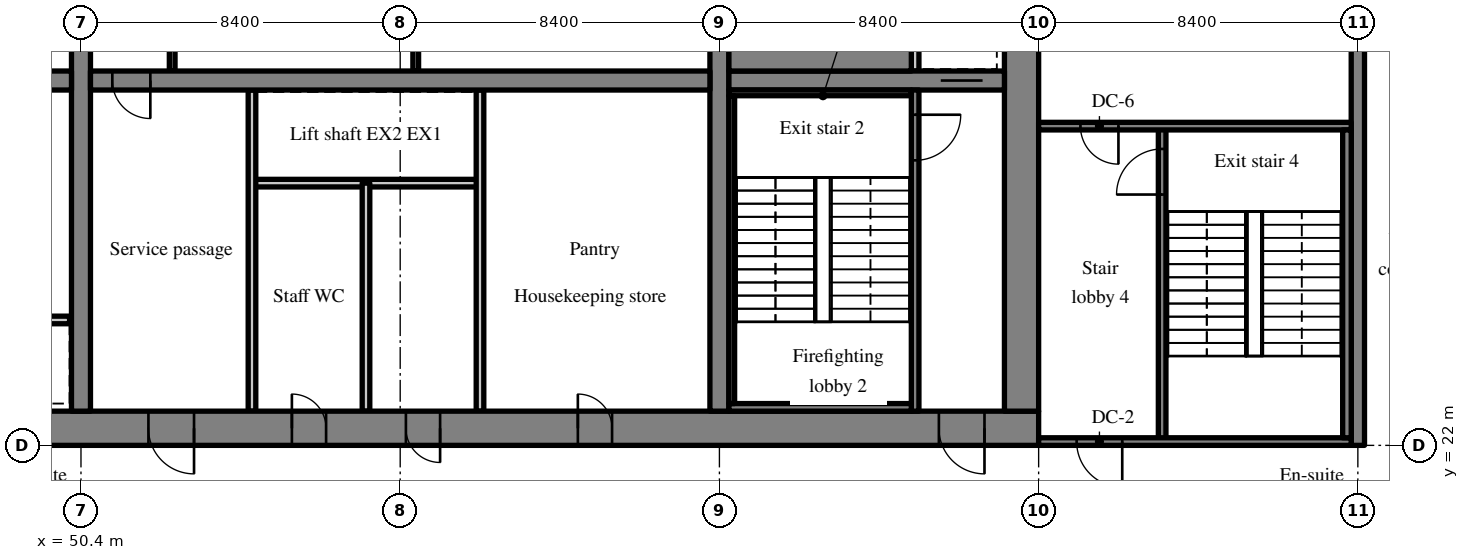
"""IFC4 building model, lengths in metres.
Left out: names, types, materials, properties, quantities, classifications, styles, units other than length and angle.
Written with IfcOpenShell. Run it as: python <this file> out.ifc"""

import sys

from ifc_helpers import new_model, si_unit, direction, frame, frame_2d, origin, place, context, subcontext, project, spatial, rectangle, extrude, source, transform, mapped, element, fill, save


model = new_model("IFC4")
c1 = context("Model", 3, precision=1e-05, world=origin(), true_north=direction((0.0, 1.0)))
c2 = subcontext(c1, "Body", "Model", "MODEL_VIEW")
j1 = project(units=[si_unit("LENGTHUNIT", "METRE"), si_unit("PLANEANGLEUNIT", "RADIAN")], contexts=[c1])
p1 = place(None, origin())
s1 = spatial("IfcSite", under=j1, at=p1, CompositionType="ELEMENT")
p2 = place(p1, origin())
s2 = spatial("IfcBuilding", under=s1, at=p2, CompositionType="ELEMENT")
p3 = place(p2, frame((0.0, 0.0, 125.6)))
s3 = spatial("IfcBuildingStorey", under=s2, at=p3, CompositionType="ELEMENT", Elevation=125.6)
m1 = source(origin(), c2, "Body", "SweptSolid", [
    extrude(rectangle(XDim=50.4, YDim=0.9, at=frame_2d((25.2, 0.0))), origin(), (0.0, 0.0, 1.0), 3.52),
])
p4 = place(p3, frame((25.2, 22.45, 0.0), z_axis=(0.0, 0.0, 1.0), x_axis=(1.0, 0.0, 0.0)))
e1 = element("IfcWall", 1, at=p4, inside=s3, PredefinedType="SHEAR", context=c2, shape_type="MappedRepresentation", body=[
    mapped(m1, transform((0.0, 0.0, 0.0), scale=1.0)),
])
m2 = source(origin(), c2, "Body", "SweptSolid", [
    extrude(rectangle(XDim=1.8, YDim=2.1, at=frame_2d((0.9, 1.05))), frame((0.0, 0.46, 0.0), z_axis=(0.0, -1.0, 0.0), x_axis=(1.0, 0.0, 0.0)), (0.0, 0.0, 1.0), 0.92),
])
p5 = place(p4, frame((15.9, 0.0, 0.0)))
e2 = element("IfcOpeningElement", 2, at=p5, cuts=e1, PredefinedType="OPENING", context=c2, shape_type="MappedRepresentation", body=[
    mapped(m2, transform((0.0, 0.0, 0.0), scale=1.0)),
])
m3 = source(origin(), c2, "Body", "SweptSolid", [
    extrude(rectangle(XDim=1.2, YDim=2.1, at=frame_2d((0.6, 1.05))), frame((0.0, 0.46, 0.0), z_axis=(0.0, -1.0, 0.0), x_axis=(1.0, 0.0, 0.0)), (0.0, 0.0, 1.0), 0.92),
])
p6 = place(p4, frame((26.975, 0.0, 0.0)))
e3 = element("IfcOpeningElement", 3, at=p6, cuts=e1, PredefinedType="OPENING", context=c2, shape_type="MappedRepresentation", body=[
    mapped(m3, transform((0.0, 0.0, 0.0), scale=1.0)),
])
m4 = source(origin(), c2, "Body", "SweptSolid", [
    extrude(rectangle(XDim=0.9, YDim=2.1, at=frame_2d((0.45, 1.05))), frame((0.0, 0.46, 0.0), z_axis=(0.0, -1.0, 0.0), x_axis=(1.0, 0.0, 0.0)), (0.0, 0.0, 1.0), 0.92),
])
p7 = place(p4, frame((33.75, 0.0, 0.0)))
e4 = element("IfcOpeningElement", 4, at=p7, cuts=e1, PredefinedType="OPENING", context=c2, shape_type="MappedRepresentation", body=[
    mapped(m4, transform((0.0, 0.0, 0.0), scale=1.0)),
])
p8 = place(p4, frame((30.75, 0.0, 0.0)))
e5 = element("IfcOpeningElement", 5, at=p8, cuts=e1, PredefinedType="OPENING", context=c2, shape_type="MappedRepresentation", body=[
    mapped(m4, transform((0.0, 0.0, 0.0), scale=1.0)),
])
p9 = place(p4, frame((38.275, 0.0, 0.0)))
e6 = element("IfcOpeningElement", 6, at=p9, cuts=e1, PredefinedType="OPENING", context=c2, shape_type="MappedRepresentation", body=[
    mapped(m4, transform((0.0, 0.0, 0.0), scale=1.0)),
])
p10 = place(p4, frame((6.45, 0.0, 0.0)))
e7 = element("IfcOpeningElement", 7, at=p10, cuts=e1, PredefinedType="OPENING", context=c2, shape_type="MappedRepresentation", body=[
    mapped(m3, transform((0.0, 0.0, 0.0), scale=1.0)),
])
p11 = place(p4, frame((47.775, 0.0, 0.0)))
e8 = element("IfcOpeningElement", 8, at=p11, cuts=e1, PredefinedType="OPENING", context=c2, shape_type="MappedRepresentation", body=[
    mapped(m3, transform((0.0, 0.0, 0.0), scale=1.0)),
])
m5 = source(origin(), c2, "Body", "SweptSolid", [
    extrude(rectangle(XDim=18.2, YDim=0.9, at=frame_2d((9.1, 0.0))), origin(), (0.0, 0.0, 1.0), 3.52),
])
p12 = place(p3, frame((75.15, 22.9, 0.0), z_axis=(0.0, 0.0, 1.0), x_axis=(0.0, 1.0, 0.0)))
e9 = element("IfcWall", 9, at=p12, inside=s3, PredefinedType="SHEAR", context=c2, shape_type="MappedRepresentation", body=[
    mapped(m5, transform((0.0, 0.0, 0.0), scale=1.0)),
])
p13 = place(p12, frame((12.5, 0.0, 0.0)))
e10 = element("IfcOpeningElement", 10, at=p13, cuts=e9, PredefinedType="OPENING", context=c2, shape_type="MappedRepresentation", body=[
    mapped(m3, transform((0.0, 0.0, 0.0), scale=1.0)),
])
m6 = source(origin(), c2, "Body", "SweptSolid", [
    extrude(rectangle(XDim=18.2, YDim=0.5, at=frame_2d((9.1, 0.0))), origin(), (0.0, 0.0, 1.0), 3.52),
])
p14 = place(p3, frame((50.4, 22.9, 0.0), z_axis=(0.0, 0.0, 1.0), x_axis=(0.0, 1.0, 0.0)))
e11 = element("IfcWall", 11, at=p14, inside=s3, PredefinedType="SHEAR", context=c2, shape_type="MappedRepresentation", body=[
    mapped(m6, transform((0.0, 0.0, 0.0), scale=1.0)),
])
m7 = source(origin(), c2, "Body", "SweptSolid", [
    extrude(rectangle(XDim=1.1, YDim=2.1, at=frame_2d((0.55, 1.05))), frame((0.0, 0.26, 0.0), z_axis=(0.0, -1.0, 0.0), x_axis=(1.0, 0.0, 0.0)), (0.0, 0.0, 1.0), 0.52),
])
p15 = place(p14, frame((12.55, 0.0, 0.0)))
e12 = element("IfcOpeningElement", 12, at=p15, cuts=e11, PredefinedType="OPENING", context=c2, shape_type="MappedRepresentation", body=[
    mapped(m7, transform((0.0, 0.0, 0.0), scale=1.0)),
])
p16 = place(p3, frame((67.2, 22.9, 0.0), z_axis=(0.0, 0.0, 1.0), x_axis=(0.0, 1.0, 0.0)))
e13 = element("IfcWall", 13, at=p16, inside=s3, PredefinedType="SHEAR", context=c2, shape_type="MappedRepresentation", body=[
    mapped(m6, transform((0.0, 0.0, 0.0), scale=1.0)),
])
m8 = source(origin(), c2, "Body", "SweptSolid", [
    extrude(rectangle(XDim=16.3, YDim=0.5, at=frame_2d((8.15, 0.0))), origin(), (0.0, 0.0, 1.0), 3.52),
])
p17 = place(p3, frame((33.85, 31.6, 0.0), z_axis=(0.0, 0.0, 1.0), x_axis=(1.0, 0.0, 0.0)))
e14 = element("IfcWall", 14, at=p17, inside=s3, PredefinedType="SHEAR", context=c2, shape_type="MappedRepresentation", body=[
    mapped(m8, transform((0.0, 0.0, 0.0), scale=1.0)),
])
m9 = source(origin(), c2, "Body", "SweptSolid", [
    extrude(rectangle(XDim=1.0, YDim=2.1, at=frame_2d((0.5, 1.05))), frame((0.0, 0.26, 0.0), z_axis=(0.0, -1.0, 0.0), x_axis=(1.0, 0.0, 0.0)), (0.0, 0.0, 1.0), 0.52),
])
p18 = place(p17, frame((14.725, 0.0, 0.0)))
e15 = element("IfcOpeningElement", 15, at=p18, cuts=e14, PredefinedType="OPENING", context=c2, shape_type="MappedRepresentation", body=[
    mapped(m9, transform((0.0, 0.0, 0.0), scale=1.0)),
])
m10 = source(origin(), c2, "Body", "SweptSolid", [
    extrude(rectangle(XDim=16.3, YDim=0.5, at=frame_2d((8.15, 0.0))), origin(), (0.0, 0.0, 1.0), 3.52),
])
p19 = place(p3, frame((50.65, 31.6, 0.0), z_axis=(0.0, 0.0, 1.0), x_axis=(1.0, 0.0, 0.0)))
e16 = element("IfcWall", 16, at=p19, inside=s3, PredefinedType="SHEAR", context=c2, shape_type="MappedRepresentation", body=[
    mapped(m10, transform((0.0, 0.0, 0.0), scale=1.0)),
])
p20 = place(p19, frame((0.575, 0.0, 0.0)))
e17 = element("IfcOpeningElement", 17, at=p20, cuts=e16, PredefinedType="OPENING", context=c2, shape_type="MappedRepresentation", body=[
    mapped(m9, transform((0.0, 0.0, 0.0), scale=1.0)),
])
m11 = source(origin(), c2, "Body", "SweptSolid", [
    extrude(rectangle(XDim=7.25, YDim=0.5, at=frame_2d((3.625, 0.0))), origin(), (0.0, 0.0, 1.0), 3.52),
])
p21 = place(p3, frame((67.45, 31.6, 0.0), z_axis=(0.0, 0.0, 1.0), x_axis=(1.0, 0.0, 0.0)))
e18 = element("IfcWall", 18, at=p21, inside=s3, PredefinedType="SHEAR", context=c2, shape_type="MappedRepresentation", body=[
    mapped(m11, transform((0.0, 0.0, 0.0), scale=1.0)),
])
p22 = place(p21, frame((5.575, 0.0, 0.0)))
e19 = element("IfcOpeningElement", 19, at=p22, cuts=e18, PredefinedType="OPENING", context=c2, shape_type="MappedRepresentation", body=[
    mapped(m7, transform((0.0, 0.0, 0.0), scale=1.0)),
])
m12 = source(origin(), c2, "Body", "SweptSolid", [
    extrude(rectangle(XDim=20.0, YDim=0.35, at=frame_2d((10.0, 0.0))), origin(), (0.0, 0.0, 1.0), 3.52),
])
p23 = place(p3, frame((84.0, 22.0, 0.0), z_axis=(0.0, 0.0, 1.0), x_axis=(0.0, 1.0, 0.0)))
e20 = element("IfcWall", 20, at=p23, inside=s3, PredefinedType="SHEAR", context=c2, shape_type="MappedRepresentation", body=[
    mapped(m12, transform((0.0, 0.0, 0.0), scale=1.0)),
])
m13 = source(origin(), c2, "Body", "SweptSolid", [
    extrude(rectangle(XDim=6.0, YDim=0.2, at=frame_2d((3.0, 0.0))), origin(), (0.0, 0.0, 1.0), 3.52),
])
p24 = place(p3, frame((44.1, 25.3, 0.0), z_axis=(0.0, 0.0, 1.0), x_axis=(1.0, 0.0, 0.0)))
e21 = element("IfcWall", 21, at=p24, inside=s3, PredefinedType="SOLIDWALL", context=c2, shape_type="MappedRepresentation", body=[
    mapped(m13, transform((0.0, 0.0, 0.0), scale=1.0)),
])
m14 = source(origin(), c2, "Body", "SweptSolid", [
    extrude(rectangle(XDim=1.1, YDim=2.1, at=frame_2d((0.55, 1.05))), frame((0.0, 0.11, 0.0), z_axis=(0.0, -1.0, 0.0), x_axis=(1.0, 0.0, 0.0)), (0.0, 0.0, 1.0), 0.22),
])
p25 = place(p24, frame((0.95, 0.0, 0.0)))
e22 = element("IfcOpeningElement", 22, at=p25, cuts=e21, PredefinedType="OPENING", context=c2, shape_type="MappedRepresentation", body=[
    mapped(m14, transform((0.0, 0.0, 0.0), scale=1.0)),
])
p26 = place(p24, frame((3.95, 0.0, 0.0)))
e23 = element("IfcOpeningElement", 23, at=p26, cuts=e21, PredefinedType="OPENING", context=c2, shape_type="MappedRepresentation", body=[
    mapped(m14, transform((0.0, 0.0, 0.0), scale=1.0)),
])
p27 = place(p3, frame((60.9, 28.9, 0.0), z_axis=(0.0, 0.0, 1.0), x_axis=(-1.0, 0.0, 0.0)))
e24 = element("IfcWall", 24, at=p27, inside=s3, PredefinedType="SOLIDWALL", context=c2, shape_type="MappedRepresentation", body=[
    mapped(m13, transform((0.0, 0.0, 0.0), scale=1.0)),
])
m15 = source(origin(), c2, "Body", "SweptSolid", [
    extrude(rectangle(XDim=8.45, YDim=0.2, at=frame_2d((4.225, 0.0))), origin(), (0.0, 0.0, 1.0), 3.52),
])
for number, where, z_axis, x_axis in (
    (25, (54.9, 22.9, 0.0), (0.0, 0.0, 1.0), (0.0, 1.0, 0.0)),
    (26, (60.9, 22.9, 0.0), (0.0, 0.0, 1.0), (0.0, 1.0, 0.0)),
):
    element("IfcWall", number, at=place(p3, frame(where, z_axis=z_axis, x_axis=x_axis)), inside=s3, PredefinedType="PARTITIONING", context=c2, shape_type="MappedRepresentation", body=[
        mapped(m15, transform((0.0, 0.0, 0.0), scale=1.0)),
    ])
p28 = place(p3, frame((57.9, 22.9, 0.0), z_axis=(0.0, 0.0, 1.0), x_axis=(0.0, 1.0, 0.0)))
e27 = element("IfcWall", 27, at=p28, inside=s3, PredefinedType="PARTITIONING", context=c2, shape_type="MappedRepresentation", body=[
    mapped(m13, transform((0.0, 0.0, 0.0), scale=1.0)),
])
m16 = source(origin(), c2, "Body", "SweptSolid", [
    extrude(rectangle(XDim=3.15, YDim=0.15, at=frame_2d((1.575, 0.0))), origin(), (0.0, 0.0, 1.0), 3.52),
])
for number, where, z_axis, x_axis in (
    (28, (52.8, 31.85, 0.0), (0.0, 0.0, 1.0), (0.0, 1.0, 0.0)),
    (29, (59.209, 31.85, 0.0), (0.0, 0.0, 1.0), (0.0, 1.0, 0.0)),
):
    element("IfcWall", number, at=place(p3, frame(where, z_axis=z_axis, x_axis=x_axis)), inside=s3, PredefinedType="PARTITIONING", context=c2, shape_type="MappedRepresentation", body=[
        mapped(m16, transform((0.0, 0.0, 0.0), scale=1.0)),
    ])
m17 = source(origin(), c2, "Body", "SweptSolid", [
    extrude(rectangle(XDim=8.45, YDim=0.2, at=frame_2d((4.225, 0.0))), origin(), (0.0, 0.0, 1.0), 3.52),
])
p29 = place(p3, frame((72.35, 22.9, 0.0), z_axis=(0.0, 0.0, 1.0), x_axis=(0.0, 1.0, 0.0)))
e30 = element("IfcWall", 30, at=p29, inside=s3, PredefinedType="SOLIDWALL", context=c2, shape_type="MappedRepresentation", body=[
    mapped(m17, transform((0.0, 0.0, 0.0), scale=1.0)),
])
m18 = source(origin(), c2, "Body", "SweptSolid", [
    extrude(rectangle(XDim=1.2, YDim=2.1, at=frame_2d((0.6, 1.05))), frame((0.0, 0.11, 0.0), z_axis=(0.0, -1.0, 0.0), x_axis=(1.0, 0.0, 0.0)), (0.0, 0.0, 1.0), 0.22),
])
p30 = place(p29, frame((6.6, 0.0, 0.0)))
e31 = element("IfcOpeningElement", 31, at=p30, cuts=e30, PredefinedType="OPENING", context=c2, shape_type="MappedRepresentation", body=[
    mapped(m18, transform((0.0, 0.0, 0.0), scale=1.0)),
])
m19 = source(origin(), c2, "Body", "SweptSolid", [
    extrude(rectangle(XDim=1.75, YDim=0.2, at=frame_2d((0.875, 0.0))), origin(), (0.0, 0.0, 1.0), 3.52),
])
p31 = place(p3, frame((72.35, 31.85, 0.0), z_axis=(0.0, 0.0, 1.0), x_axis=(0.0, 1.0, 0.0)))
e32 = element("IfcWall", 32, at=p31, inside=s3, PredefinedType="SOLIDWALL", context=c2, shape_type="MappedRepresentation", body=[
    mapped(m19, transform((0.0, 0.0, 0.0), scale=1.0)),
])
m20 = source(origin(), c2, "Body", "SweptSolid", [
    extrude(rectangle(XDim=8.3, YDim=0.2, at=frame_2d((4.15, 0.0))), origin(), (0.0, 0.0, 1.0), 3.52),
])
p32 = place(p3, frame((78.85, 22.1, 0.0), z_axis=(0.0, 0.0, 1.0), x_axis=(0.0, 1.0, 0.0)))
e33 = element("IfcWall", 33, at=p32, inside=s3, PredefinedType="SOLIDWALL", context=c2, shape_type="MappedRepresentation", body=[
    mapped(m20, transform((0.0, 0.0, 0.0), scale=1.0)),
])
p33 = place(p32, frame((6.5, 0.0, 0.0)))
e34 = element("IfcOpeningElement", 34, at=p33, cuts=e33, PredefinedType="OPENING", context=c2, shape_type="MappedRepresentation", body=[
    mapped(m18, transform((0.0, 0.0, 0.0), scale=1.0)),
])
m21 = source(origin(), c2, "Body", "SweptSolid", [
    extrude(rectangle(XDim=8.225, YDim=0.2, at=frame_2d((4.112, 0.0))), origin(), (0.0, 0.0, 1.0), 3.52),
])
p34 = place(p3, frame((83.825, 22.1, 0.0), z_axis=(0.0, 0.0, 1.0), x_axis=(-1.0, 0.0, 0.0)))
e35 = element("IfcWall", 35, at=p34, inside=s3, PredefinedType="SOLIDWALL", context=c2, shape_type="MappedRepresentation", body=[
    mapped(m21, transform((0.0, 0.0, 0.0), scale=1.0)),
])
p35 = place(p34, frame((6.025, 0.0, 0.0)))
e36 = element("IfcOpeningElement", 36, at=p35, cuts=e35, PredefinedType="OPENING", context=c2, shape_type="MappedRepresentation", body=[
    mapped(m18, transform((0.0, 0.0, 0.0), scale=1.0)),
])
p36 = place(p3, frame((83.825, 30.4, 0.0), z_axis=(0.0, 0.0, 1.0), x_axis=(-1.0, 0.0, 0.0)))
e37 = element("IfcWall", 37, at=p36, inside=s3, PredefinedType="SOLIDWALL", context=c2, shape_type="MappedRepresentation", body=[
    mapped(m21, transform((0.0, 0.0, 0.0), scale=1.0)),
])
m22 = source(origin(), c2, "Body", "SweptSolid", [
    extrude(rectangle(XDim=1.0, YDim=2.1, at=frame_2d((0.5, 1.05))), frame((0.0, 0.11, 0.0), z_axis=(0.0, -1.0, 0.0), x_axis=(1.0, 0.0, 0.0)), (0.0, 0.0, 1.0), 0.22),
])
p37 = place(p36, frame((6.125, 0.0, 0.0)))
e38 = element("IfcOpeningElement", 38, at=p37, cuts=e37, PredefinedType="OPENING", context=c2, shape_type="MappedRepresentation", body=[
    mapped(m22, transform((0.0, 0.0, 0.0), scale=1.0)),
])
m23 = source(origin(), c2, "Body", "SweptSolid", [
    extrude(rectangle(XDim=4.8, YDim=0.2, at=frame_2d((2.4, 0.0))), origin(), (0.0, 0.0, 1.0), 3.52),
])
p38 = place(p3, frame((67.45, 23.0, 0.0), z_axis=(0.0, 0.0, 1.0), x_axis=(1.0, 0.0, 0.0)))
e39 = element("IfcWall", 39, at=p38, inside=s3, PredefinedType="SOLIDWALL", context=c2, shape_type="MappedRepresentation", body=[
    mapped(m23, transform((0.0, 0.0, 0.0), scale=1.0)),
])
m24 = source(origin(), c2, "Body", "SweptSolid", [
    extrude(rectangle(XDim=4.8, YDim=0.15, at=frame_2d((2.4, 0.0))), origin(), (0.0, 0.0, 1.0), 3.52),
])
p39 = place(p3, frame((67.45, 31.275, 0.0), z_axis=(0.0, 0.0, 1.0), x_axis=(1.0, 0.0, 0.0)))
e40 = element("IfcWall", 40, at=p39, inside=s3, PredefinedType="SOLIDWALL", context=c2, shape_type="MappedRepresentation", body=[
    mapped(m24, transform((0.0, 0.0, 0.0), scale=1.0)),
])
m25 = source(origin(), c2, "Body", "SweptSolid", [
    extrude(rectangle(XDim=8.1, YDim=0.15, at=frame_2d((4.05, 0.0))), origin(), (0.0, 0.0, 1.0), 3.52),
])
p40 = place(p3, frame((67.525, 23.1, 0.0), z_axis=(0.0, 0.0, 1.0), x_axis=(0.0, 1.0, 0.0)))
e41 = element("IfcWall", 41, at=p40, inside=s3, PredefinedType="SOLIDWALL", context=c2, shape_type="MappedRepresentation", body=[
    mapped(m25, transform((0.0, 0.0, 0.0), scale=1.0)),
])
m26 = source(origin(), c2, "Body", "SweptSolid", [
    extrude(rectangle(XDim=4.8, YDim=0.95, at=frame_2d((2.4, 0.0))), origin(), (0.0, 0.0, 1.0), 3.52),
])
p41 = place(p3, frame((67.45, 32.325, 0.0), z_axis=(0.0, 0.0, 1.0), x_axis=(1.0, 0.0, 0.0)))
e42 = element("IfcWall", 42, at=p41, inside=s3, PredefinedType="SOLIDWALL", context=c2, shape_type="MappedRepresentation", body=[
    mapped(m26, transform((0.0, 0.0, 0.0), scale=1.0)),
])
m27 = source(origin(), c2, "Body", "SweptSolid", [
    extrude(rectangle(XDim=8.1, YDim=0.225, at=frame_2d((4.05, 0.0))), origin(), (0.0, 0.0, 1.0), 3.52),
])
p42 = place(p3, frame((83.713, 22.2, 0.0), z_axis=(0.0, 0.0, 1.0), x_axis=(0.0, 1.0, 0.0)))
e43 = element("IfcWall", 43, at=p42, inside=s3, PredefinedType="SOLIDWALL", context=c2, shape_type="MappedRepresentation", body=[
    mapped(m27, transform((0.0, 0.0, 0.0), scale=1.0)),
])
m28 = source(origin(), c2, "Body", "SweptSolid", [
    extrude(rectangle(XDim=1.2, YDim=2.1, at=frame_2d((0.6, 1.05))), frame((0.0, 0.375, 0.0), z_axis=(0.0, -1.0, 0.0), x_axis=(1.0, 0.0, 0.0)), (0.0, 0.0, 1.0), 0.05),
])
p43 = place(p6, origin())
e44 = element("IfcDoor", 44, at=p43, inside=s3, OperationType="SINGLE_SWING_RIGHT", PredefinedType="DOOR", context=c2, shape_type="MappedRepresentation", body=[
    mapped(m28, transform((0.0, 0.0, 0.0), scale=1.0)),
])
fill(e3, e44)
m29 = source(origin(), c2, "Body", "SweptSolid", [
    extrude(rectangle(XDim=1.0, YDim=2.1, at=frame_2d((0.5, 1.05))), frame((0.0, 0.025, 0.0), z_axis=(0.0, -1.0, 0.0), x_axis=(1.0, 0.0, 0.0)), (0.0, 0.0, 1.0), 0.05),
])
p44 = place(p20, origin())
e45 = element("IfcDoor", 45, at=p44, inside=s3, OperationType="SINGLE_SWING_RIGHT", PredefinedType="DOOR", context=c2, shape_type="MappedRepresentation", body=[
    mapped(m29, transform((0.0, 0.0, 0.0), scale=1.0)),
])
fill(e17, e45)
m30 = source(origin(), c2, "Body", "SweptSolid", [
    extrude(rectangle(XDim=0.9, YDim=2.1, at=frame_2d((0.45, 1.05))), frame((0.0, 0.375, 0.0), z_axis=(0.0, -1.0, 0.0), x_axis=(1.0, 0.0, 0.0)), (0.0, 0.0, 1.0), 0.05),
])
p45 = place(p7, origin())
e46 = element("IfcDoor", 46, at=p45, inside=s3, OperationType="SINGLE_SWING_RIGHT", PredefinedType="DOOR", context=c2, shape_type="MappedRepresentation", body=[
    mapped(m30, transform((0.0, 0.0, 0.0), scale=1.0)),
])
fill(e4, e46)
p46 = place(p8, origin())
e47 = element("IfcDoor", 47, at=p46, inside=s3, OperationType="SINGLE_SWING_LEFT", PredefinedType="DOOR", context=c2, shape_type="MappedRepresentation", body=[
    mapped(m30, transform((0.0, 0.0, 0.0), scale=1.0)),
])
fill(e5, e47)
p47 = place(p9, origin())
e48 = element("IfcDoor", 48, at=p47, inside=s3, OperationType="SINGLE_SWING_LEFT", PredefinedType="DOOR", context=c2, shape_type="MappedRepresentation", body=[
    mapped(m30, transform((0.0, 0.0, 0.0), scale=1.0)),
])
fill(e6, e48)
m31 = source(origin(), c2, "Body", "SweptSolid", [
    extrude(rectangle(XDim=1.2, YDim=2.1, at=frame_2d((0.6, 1.05))), frame((0.0, 0.025, 0.0), z_axis=(0.0, -1.0, 0.0), x_axis=(1.0, 0.0, 0.0)), (0.0, 0.0, 1.0), 0.05),
])
p48 = place(p30, origin())
e49 = element("IfcDoor", 49, at=p48, inside=s3, OperationType="SINGLE_SWING_RIGHT", PredefinedType="DOOR", context=c2, shape_type="MappedRepresentation", body=[
    mapped(m31, transform((0.0, 0.0, 0.0), scale=1.0)),
])
fill(e31, e49)
p49 = place(p11, origin())
e50 = element("IfcDoor", 50, at=p49, inside=s3, OperationType="SINGLE_SWING_RIGHT", PredefinedType="DOOR", context=c2, shape_type="MappedRepresentation", body=[
    mapped(m28, transform((0.0, 0.0, 0.0), scale=1.0)),
])
fill(e8, e50)
m32 = source(origin(), c2, "Body", "SweptSolid", [
    extrude(rectangle(XDim=1.1, YDim=2.1, at=frame_2d((0.55, 1.05))), frame((0.0, 0.025, 0.0), z_axis=(0.0, -1.0, 0.0), x_axis=(1.0, 0.0, 0.0)), (0.0, 0.0, 1.0), 0.05),
])
p50 = place(p22, origin())
e51 = element("IfcDoor", 51, at=p50, inside=s3, OperationType="SLIDING_TO_LEFT", PredefinedType="DOOR", context=c2, shape_type="MappedRepresentation", body=[
    mapped(m32, transform((0.0, 0.0, 0.0), scale=1.0)),
])
fill(e19, e51)
p51 = place(p33, origin())
e52 = element("IfcDoor", 52, at=p51, inside=s3, OperationType="SINGLE_SWING_LEFT", PredefinedType="DOOR", context=c2, shape_type="MappedRepresentation", body=[
    mapped(m31, transform((0.0, 0.0, 0.0), scale=1.0)),
])
fill(e34, e52)
p52 = place(p35, origin())
e53 = element("IfcDoor", 53, at=p52, inside=s3, OperationType="SINGLE_SWING_LEFT", PredefinedType="DOOR", context=c2, shape_type="MappedRepresentation", body=[
    mapped(m31, transform((0.0, 0.0, 0.0), scale=1.0)),
])
fill(e36, e53)
p53 = place(p37, origin())
e54 = element("IfcDoor", 54, at=p53, inside=s3, OperationType="SINGLE_SWING_LEFT", PredefinedType="DOOR", context=c2, shape_type="MappedRepresentation", body=[
    mapped(m29, transform((0.0, 0.0, 0.0), scale=1.0)),
])
fill(e38, e54)
save(model, sys.argv[1])
